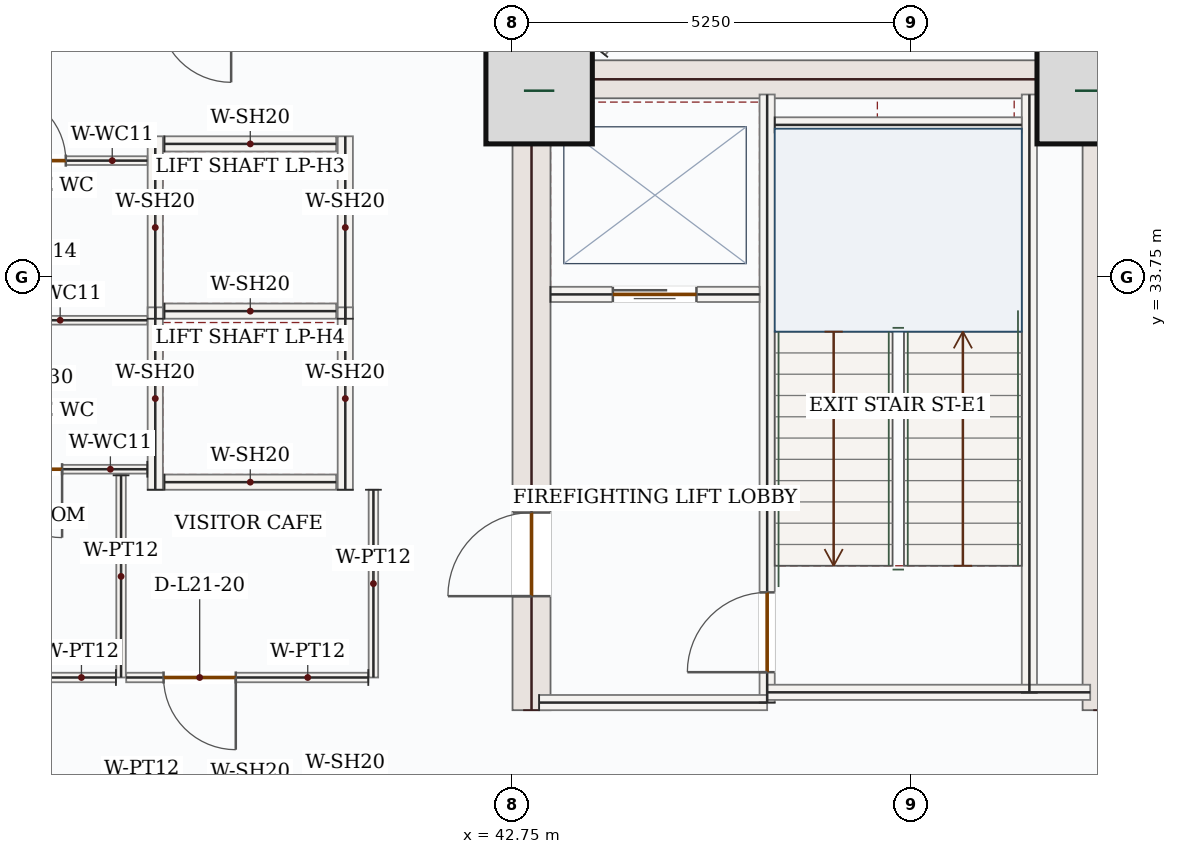
"""IFC4 building model, lengths in metres.
Left out: names, types, materials, properties, quantities, classifications, styles, units other than length and angle.
Written with IfcOpenShell. Run it as: python <this file> out.ifc"""

import sys

from ifc_helpers import new_model, si_unit, direction, frame, frame_2d, origin, origin_2d, place, context, subcontext, project, spatial, rectangle, extrude, source, transform, mapped, element, fill, save


model = new_model("IFC4")
c1 = context("Model", 3, precision=1e-05, world=origin(), true_north=direction((0.0, 1.0)))
c2 = subcontext(c1, "Body", "Model", "MODEL_VIEW")
j1 = project(units=[si_unit("LENGTHUNIT", "METRE"), si_unit("PLANEANGLEUNIT", "RADIAN")], contexts=[c1])
p1 = place(None, origin())
s1 = spatial("IfcSite", under=j1, at=p1, CompositionType="ELEMENT")
p2 = place(p1, origin())
s2 = spatial("IfcBuilding", under=s1, at=p2, CompositionType="ELEMENT")
p3 = place(p2, frame((0.0, 0.0, 96.3)))
s3 = spatial("IfcBuildingStorey", under=s2, at=p3, CompositionType="ELEMENT", Elevation=96.3)
p4 = place(p3, frame((43.0, 28.05, 0.0), z_axis=(0.0, 0.0, 1.0), x_axis=(0.0, 1.0, 0.0)))
e1 = element("IfcWall", 1, at=p4, inside=s3, PredefinedType="SHEAR", context=c2, shape_type="SweptSolid", body=[
    extrude(rectangle(XDim=8.55, YDim=0.5, at=frame_2d((4.275, 0.0))), origin(), (0.0, 0.0, 1.0), 3.95),
])
p5 = place(p4, frame((1.5, 0.0, 0.0)))
e2 = element("IfcOpeningElement", 2, at=p5, cuts=e1, PredefinedType="OPENING", context=c2, shape_type="SweptSolid", body=[
    extrude(rectangle(XDim=1.1, YDim=2.2, at=frame_2d((0.55, 1.1))), frame((0.0, 0.26, 0.0), z_axis=(0.0, -1.0, 0.0), x_axis=(1.0, 0.0, 0.0)), (0.0, 0.0, 1.0), 0.52),
])
m1 = source(origin(), c2, "Body", "SweptSolid", [
    extrude(rectangle(XDim=8.55, YDim=0.5, at=frame_2d((4.275, 0.0))), origin(), (0.0, 0.0, 1.0), 3.95),
])
p6 = place(p3, frame((50.5, 28.05, 0.0), z_axis=(0.0, 0.0, 1.0), x_axis=(0.0, 1.0, 0.0)))
e3 = element("IfcWall", 3, at=p6, inside=s3, PredefinedType="SHEAR", context=c2, shape_type="MappedRepresentation", body=[
    mapped(m1, transform((0.0, 0.0, 0.0), x_axis=(1.0, 0.0, 0.0), y_axis=(0.0, 1.0, 0.0), z_axis=(0.0, 0.0, 1.0), scale=1.0)),
])
m2 = source(origin(), c2, "Body", "SweptSolid", [
    extrude(rectangle(XDim=7.0, YDim=0.5, at=frame_2d((3.5, 0.0))), origin(), (0.0, 0.0, 1.0), 3.95),
])
p7 = place(p3, frame((43.25, 36.35, 0.0), z_axis=(0.0, 0.0, 1.0), x_axis=(1.0, 0.0, 0.0)))
e4 = element("IfcWall", 4, at=p7, inside=s3, PredefinedType="SHEAR", context=c2, shape_type="MappedRepresentation", body=[
    mapped(m2, transform((0.0, 0.0, 0.0), x_axis=(1.0, 0.0, 0.0), y_axis=(0.0, 1.0, 0.0), z_axis=(0.0, 0.0, 1.0), scale=1.0)),
])
m3 = source(origin(), c2, "Body", "SweptSolid", [
    extrude(rectangle(XDim=1.4, YDim=1.4, at=origin_2d()), origin(), (0.0, 0.0, 1.0), 4.2),
])
for number, where, z_axis, x_axis in (
    (5, (43.1, 36.2, 0.0), (0.0, 0.0, 1.0), (1.0, 0.0, 0.0)),
    (6, (50.35, 36.2, 0.0), (0.0, 0.0, 1.0), (1.0, 0.0, 0.0)),
):
    element("IfcColumn", number, at=place(p3, frame(where, z_axis=z_axis, x_axis=x_axis)), inside=s3, PredefinedType="COLUMN", context=c2, shape_type="MappedRepresentation", body=[
        mapped(m3, transform((0.0, 0.0, 0.0), x_axis=(1.0, 0.0, 0.0), y_axis=(0.0, 1.0, 0.0), z_axis=(0.0, 0.0, 1.0), scale=1.0)),
    ])
p8 = place(p3, frame((49.342, 39.26, 0.0), z_axis=(0.0, 0.0, 1.0), x_axis=(0.707106781187, -0.707106781187, 0.0)))
e7 = element("IfcWall", 7, at=p8, inside=s3, PredefinedType="SOLIDWALL", context=c2, shape_type="SweptSolid", body=[
    extrude(rectangle(XDim=5.258, YDim=0.32, at=frame_2d((2.629, 0.0))), origin(), (0.0, 0.0, 1.0), 3.95),
])
p9 = place(p8, frame((1.429, 0.0, 0.85)))
e8 = element("IfcOpeningElement", 8, at=p9, cuts=e7, PredefinedType="OPENING", context=c2, shape_type="SweptSolid", body=[
    extrude(rectangle(XDim=2.4, YDim=1.8, at=frame_2d((1.2, 0.9))), frame((0.0, 0.17, 0.0), z_axis=(0.0, -1.0, 0.0), x_axis=(1.0, 0.0, 0.0)), (0.0, 0.0, 1.0), 0.34),
])
m4 = source(origin(), c2, "Body", "SweptSolid", [
    extrude(rectangle(XDim=7.87, YDim=0.2, at=frame_2d((3.935, 0.0))), origin(), (0.0, 0.0, 1.0), 3.95),
])
p10 = place(p3, frame((49.55, 28.28, 0.0), z_axis=(0.0, 0.0, 1.0), x_axis=(0.0, 1.0, 0.0)))
e9 = element("IfcWall", 9, at=p10, inside=s3, PredefinedType="SOLIDWALL", context=c2, shape_type="MappedRepresentation", body=[
    mapped(m4, transform((0.0, 0.0, 0.0), x_axis=(1.0, 0.0, 0.0), y_axis=(0.0, 1.0, 0.0), z_axis=(0.0, 0.0, 1.0), scale=1.0)),
])
p11 = place(p3, frame((46.1, 28.15, 0.0), z_axis=(0.0, 0.0, 1.0), x_axis=(0.0, 1.0, 0.0)))
e10 = element("IfcWall", 10, at=p11, inside=s3, PredefinedType="SOLIDWALL", context=c2, shape_type="SweptSolid", body=[
    extrude(rectangle(XDim=8.0, YDim=0.2, at=frame_2d((4.0, 0.0))), origin(), (0.0, 0.0, 1.0), 3.95),
])
p12 = place(p11, frame((0.4, 0.0, 0.0)))
e11 = element("IfcOpeningElement", 11, at=p12, cuts=e10, PredefinedType="OPENING", context=c2, shape_type="SweptSolid", body=[
    extrude(rectangle(XDim=1.05, YDim=2.15, at=frame_2d((0.525, 1.075))), frame((0.0, 0.11, 0.0), z_axis=(0.0, -1.0, 0.0), x_axis=(1.0, 0.0, 0.0)), (0.0, 0.0, 1.0), 0.22),
])
m5 = source(origin(), c2, "Body", "SweptSolid", [
    extrude(rectangle(XDim=3.0, YDim=0.2, at=frame_2d((1.5, 0.0))), origin(), (0.0, 0.0, 1.0), 3.95),
])
p13 = place(p3, frame((43.1, 28.15, 0.0), z_axis=(0.0, 0.0, 1.0), x_axis=(1.0, 0.0, 0.0)))
e12 = element("IfcWall", 12, at=p13, inside=s3, PredefinedType="SOLIDWALL", context=c2, shape_type="MappedRepresentation", body=[
    mapped(m5, transform((0.0, 0.0, 0.0), x_axis=(1.0, 0.0, 0.0), y_axis=(0.0, 1.0, 0.0), z_axis=(0.0, 0.0, 1.0), scale=1.0)),
])
m6 = source(origin(), c2, "Body", "SweptSolid", [
    extrude(rectangle(XDim=4.25, YDim=0.2, at=frame_2d((2.125, 0.0))), origin(), (0.0, 0.0, 1.0), 3.95),
])
p14 = place(p3, frame((46.1, 28.285, 0.0), z_axis=(0.0, 0.0, 1.0), x_axis=(1.0, 0.0, 0.0)))
e13 = element("IfcWall", 13, at=p14, inside=s3, PredefinedType="SOLIDWALL", context=c2, shape_type="MappedRepresentation", body=[
    mapped(m6, transform((0.0, 0.0, 0.0), x_axis=(1.0, 0.0, 0.0), y_axis=(0.0, 1.0, 0.0), z_axis=(0.0, 0.0, 1.0), scale=1.0)),
])
m7 = source(origin(), c2, "Body", "SweptSolid", [
    extrude(rectangle(XDim=3.25, YDim=0.2, at=frame_2d((1.625, 0.0))), origin(), (0.0, 0.0, 1.0), 3.95),
])
p15 = place(p3, frame((46.2, 35.75, 0.0), z_axis=(0.0, 0.0, 1.0), x_axis=(1.0, 0.0, 0.0)))
e14 = element("IfcWall", 14, at=p15, inside=s3, PredefinedType="SOLIDWALL", context=c2, shape_type="MappedRepresentation", body=[
    mapped(m7, transform((0.0, 0.0, 0.0), x_axis=(1.0, 0.0, 0.0), y_axis=(0.0, 1.0, 0.0), z_axis=(0.0, 0.0, 1.0), scale=1.0)),
])
p16 = place(p3, frame((43.25, 33.52, 0.0), z_axis=(0.0, 0.0, 1.0), x_axis=(1.0, 0.0, 0.0)))
e15 = element("IfcWall", 15, at=p16, inside=s3, PredefinedType="SOLIDWALL", context=c2, shape_type="SweptSolid", body=[
    extrude(rectangle(XDim=2.75, YDim=0.2, at=frame_2d((1.375, 0.0))), origin(), (0.0, 0.0, 1.0), 3.95),
])
p17 = place(p16, frame((0.82, 0.0, 0.0)))
e16 = element("IfcOpeningElement", 16, at=p17, cuts=e15, PredefinedType="OPENING", context=c2, shape_type="SweptSolid", body=[
    extrude(rectangle(XDim=1.1, YDim=2.15, at=frame_2d((0.55, 1.075))), frame((0.0, 0.11, 0.0), z_axis=(0.0, -1.0, 0.0), x_axis=(1.0, 0.0, 0.0)), (0.0, 0.0, 1.0), 0.22),
])
m8 = source(origin(), c2, "Body", "SweptSolid", [
    extrude(rectangle(XDim=2.4, YDim=0.2, at=frame_2d((1.2, 0.0))), origin(), (0.0, 0.0, 1.0), 3.95),
])
for number, where, z_axis, x_axis in (
    (17, (38.05, 33.2, 0.0), (0.0, 0.0, 1.0), (0.0, 1.0, 0.0)),
    (18, (40.55, 33.2, 0.0), (0.0, 0.0, 1.0), (0.0, 1.0, 0.0)),
):
    element("IfcWall", number, at=place(p3, frame(where, z_axis=z_axis, x_axis=x_axis)), inside=s3, PredefinedType="SOLIDWALL", context=c2, shape_type="MappedRepresentation", body=[
        mapped(m8, transform((0.0, 0.0, 0.0), x_axis=(1.0, 0.0, 0.0), y_axis=(0.0, 1.0, 0.0), z_axis=(0.0, 0.0, 1.0), scale=1.0)),
    ])
m9 = source(origin(), c2, "Body", "SweptSolid", [
    extrude(rectangle(XDim=2.26, YDim=0.2, at=frame_2d((1.13, 0.0))), origin(), (0.0, 0.0, 1.0), 3.95),
])
for number, where, z_axis, x_axis in (
    (19, (38.17, 33.3, 0.0), (0.0, 0.0, 1.0), (1.0, 0.0, 0.0)),
    (20, (38.17, 35.5, 0.0), (0.0, 0.0, 1.0), (1.0, 0.0, 0.0)),
):
    element("IfcWall", number, at=place(p3, frame(where, z_axis=z_axis, x_axis=x_axis)), inside=s3, PredefinedType="SOLIDWALL", context=c2, shape_type="MappedRepresentation", body=[
        mapped(m9, transform((0.0, 0.0, 0.0), x_axis=(1.0, 0.0, 0.0), y_axis=(0.0, 1.0, 0.0), z_axis=(0.0, 0.0, 1.0), scale=1.0)),
    ])
for number, where, z_axis, x_axis in (
    (21, (38.05, 30.95, 0.0), (0.0, 0.0, 1.0), (0.0, 1.0, 0.0)),
    (22, (40.55, 30.95, 0.0), (0.0, 0.0, 1.0), (0.0, 1.0, 0.0)),
):
    element("IfcWall", number, at=place(p3, frame(where, z_axis=z_axis, x_axis=x_axis)), inside=s3, PredefinedType="SOLIDWALL", context=c2, shape_type="MappedRepresentation", body=[
        mapped(m8, transform((0.0, 0.0, 0.0), x_axis=(1.0, 0.0, 0.0), y_axis=(0.0, 1.0, 0.0), z_axis=(0.0, 0.0, 1.0), scale=1.0)),
    ])
p18 = place(p3, frame((38.17, 31.05, 0.0), z_axis=(0.0, 0.0, 1.0), x_axis=(1.0, 0.0, 0.0)))
e23 = element("IfcWall", 23, at=p18, inside=s3, PredefinedType="SOLIDWALL", context=c2, shape_type="MappedRepresentation", body=[
    mapped(m9, transform((0.0, 0.0, 0.0), x_axis=(1.0, 0.0, 0.0), y_axis=(0.0, 1.0, 0.0), z_axis=(0.0, 0.0, 1.0), scale=1.0)),
])
p19 = place(p3, frame((37.945, 31.22, 0.0), z_axis=(0.0, 0.0, 1.0), x_axis=(-1.0, 0.0, 0.0)))
e24 = element("IfcWall", 24, at=p19, inside=s3, PredefinedType="PARTITIONING", context=c2, shape_type="SweptSolid", body=[
    extrude(rectangle(XDim=2.355, YDim=0.115, at=frame_2d((1.177, 0.0))), origin(), (0.0, 0.0, 1.0), 3.95),
])
p20 = place(p19, frame((1.121, 0.0, 0.0)))
e25 = element("IfcOpeningElement", 25, at=p20, cuts=e24, PredefinedType="OPENING", context=c2, shape_type="SweptSolid", body=[
    extrude(rectangle(XDim=0.9, YDim=2.1, at=frame_2d((0.45, 1.05))), frame((0.0, 0.067, 0.0), z_axis=(0.0, -1.0, 0.0), x_axis=(1.0, 0.0, 0.0)), (0.0, 0.0, 1.0), 0.135),
])
m10 = source(origin(), c2, "Body", "SweptSolid", [
    extrude(rectangle(XDim=2.292, YDim=0.115, at=frame_2d((1.146, 0.0))), origin(), (0.0, 0.0, 1.0), 3.95),
])
p21 = place(p3, frame((35.653, 33.18, 0.0), z_axis=(0.0, 0.0, 1.0), x_axis=(1.0, 0.0, 0.0)))
e26 = element("IfcWall", 26, at=p21, inside=s3, PredefinedType="PARTITIONING", context=c2, shape_type="MappedRepresentation", body=[
    mapped(m10, transform((0.0, 0.0, 0.0), x_axis=(1.0, 0.0, 0.0), y_axis=(0.0, 1.0, 0.0), z_axis=(0.0, 0.0, 1.0), scale=1.0)),
])
p22 = place(p3, frame((35.653, 35.28, 0.0), z_axis=(0.0, 0.0, 1.0), x_axis=(1.0, 0.0, 0.0)))
e27 = element("IfcWall", 27, at=p22, inside=s3, PredefinedType="PARTITIONING", context=c2, shape_type="SweptSolid", body=[
    extrude(rectangle(XDim=2.292, YDim=0.115, at=frame_2d((1.146, 0.0))), origin(), (0.0, 0.0, 1.0), 3.95),
])
p23 = place(p22, frame((0.32, 0.0, 0.0)))
e28 = element("IfcOpeningElement", 28, at=p23, cuts=e27, PredefinedType="OPENING", context=c2, shape_type="SweptSolid", body=[
    extrude(rectangle(XDim=0.9, YDim=2.1, at=frame_2d((0.45, 1.05))), frame((0.0, 0.067, 0.0), z_axis=(0.0, -1.0, 0.0), x_axis=(1.0, 0.0, 0.0)), (0.0, 0.0, 1.0), 0.135),
])
m11 = source(origin(), c2, "Body", "SweptSolid", [
    extrude(rectangle(XDim=2.66, YDim=0.125, at=frame_2d((1.33, 0.0))), origin(), (0.0, 0.0, 1.0), 3.95),
])
p24 = place(p3, frame((37.6, 31.14, 0.0), z_axis=(0.0, 0.0, 1.0), x_axis=(0.0, -1.0, 0.0)))
e29 = element("IfcWall", 29, at=p24, inside=s3, PredefinedType="PARTITIONING", context=c2, shape_type="MappedRepresentation", body=[
    mapped(m11, transform((0.0, 0.0, 0.0), x_axis=(1.0, 0.0, 0.0), y_axis=(0.0, 1.0, 0.0), z_axis=(0.0, 0.0, 1.0), scale=1.0)),
])
p25 = place(p3, frame((37.532, 28.48, 0.0), z_axis=(0.0, 0.0, 1.0), x_axis=(-1.0, 0.0, 0.0)))
e30 = element("IfcWall", 30, at=p25, inside=s3, PredefinedType="PARTITIONING", context=c2, shape_type="SweptSolid", body=[
    extrude(rectangle(XDim=3.065, YDim=0.125, at=frame_2d((1.532, 0.0))), origin(), (0.0, 0.0, 1.0), 3.95),
])
p26 = place(p25, frame((1.058, 0.0, 0.0)))
e31 = element("IfcOpeningElement", 31, at=p26, cuts=e30, PredefinedType="OPENING", context=c2, shape_type="SweptSolid", body=[
    extrude(rectangle(XDim=0.95, YDim=2.15, at=frame_2d((0.475, 1.075))), frame((0.0, 0.073, 0.0), z_axis=(0.0, -1.0, 0.0), x_axis=(1.0, 0.0, 0.0)), (0.0, 0.0, 1.0), 0.145),
])
m12 = source(origin(), c2, "Body", "SweptSolid", [
    extrude(rectangle(XDim=2.47, YDim=0.125, at=frame_2d((1.235, 0.0))), origin(), (0.0, 0.0, 1.0), 3.95),
])
p27 = place(p3, frame((40.92, 30.95, 0.0), z_axis=(0.0, 0.0, 1.0), x_axis=(0.0, -1.0, 0.0)))
e32 = element("IfcWall", 32, at=p27, inside=s3, PredefinedType="PARTITIONING", context=c2, shape_type="MappedRepresentation", body=[
    mapped(m12, transform((0.0, 0.0, 0.0), x_axis=(1.0, 0.0, 0.0), y_axis=(0.0, 1.0, 0.0), z_axis=(0.0, 0.0, 1.0), scale=1.0)),
])
p28 = place(p3, frame((40.853, 28.48, 0.0), z_axis=(0.0, 0.0, 1.0), x_axis=(-1.0, 0.0, 0.0)))
e33 = element("IfcWall", 33, at=p28, inside=s3, PredefinedType="PARTITIONING", context=c2, shape_type="SweptSolid", body=[
    extrude(rectangle(XDim=3.185, YDim=0.125, at=frame_2d((1.593, 0.0))), origin(), (0.0, 0.0, 1.0), 3.95),
])
p29 = place(p28, frame((1.743, 0.0, 0.0)))
e34 = element("IfcOpeningElement", 34, at=p29, cuts=e33, PredefinedType="OPENING", context=c2, shape_type="SweptSolid", body=[
    extrude(rectangle(XDim=0.95, YDim=2.15, at=frame_2d((0.475, 1.075))), frame((0.0, 0.073, 0.0), z_axis=(0.0, -1.0, 0.0), x_axis=(1.0, 0.0, 0.0)), (0.0, 0.0, 1.0), 0.145),
])
m13 = source(origin(), c2, "Body", "SweptSolid", [
    extrude(rectangle(XDim=3.072, YDim=0.125, at=frame_2d((1.536, 0.0))), origin(), (0.0, 0.0, 1.0), 3.95),
])
p30 = place(p3, frame((43.92, 36.709, 0.0), z_axis=(0.0, 0.0, 1.0), x_axis=(0.629760486176, 0.776789373029, 0.0)))
e35 = element("IfcWall", 35, at=p30, inside=s3, PredefinedType="PARTITIONING", context=c2, shape_type="MappedRepresentation", body=[
    mapped(m13, transform((0.0, 0.0, 0.0), x_axis=(1.0, 0.0, 0.0), y_axis=(0.0, 1.0, 0.0), z_axis=(0.0, 0.0, 1.0), scale=1.0)),
])
m14 = source(origin(), c2, "Body", "SweptSolid", [
    extrude(rectangle(XDim=2.4, YDim=1.8, at=frame_2d((1.2, 0.9))), frame((0.0, 0.03, 0.0), z_axis=(0.0, -1.0, 0.0), x_axis=(1.0, 0.0, 0.0)), (0.0, 0.0, 1.0), 0.06),
])
p31 = place(p9, origin())
e36 = element("IfcWindow", 36, at=p31, inside=s3, PartitioningType="DOUBLE_PANEL_VERTICAL", PredefinedType="WINDOW", context=c2, shape_type="MappedRepresentation", body=[
    mapped(m14, transform((0.0, 0.0, 0.0), x_axis=(1.0, 0.0, 0.0), y_axis=(0.0, 1.0, 0.0), z_axis=(0.0, 0.0, 1.0), scale=1.0)),
])
fill(e8, e36)
m15 = source(origin(), c2, "Body", "SweptSolid", [
    extrude(rectangle(XDim=1.05, YDim=2.15, at=frame_2d((0.525, 1.075))), frame((0.0, 0.025, 0.0), z_axis=(0.0, -1.0, 0.0), x_axis=(1.0, 0.0, 0.0)), (0.0, 0.0, 1.0), 0.05),
])
p32 = place(p12, origin())
e37 = element("IfcDoor", 37, at=p32, inside=s3, OperationType="SINGLE_SWING_LEFT", PredefinedType="DOOR", context=c2, shape_type="MappedRepresentation", body=[
    mapped(m15, transform((0.0, 0.0, 0.0), x_axis=(1.0, 0.0, 0.0), y_axis=(0.0, 1.0, 0.0), z_axis=(0.0, 0.0, 1.0), scale=1.0)),
])
fill(e11, e37)
m16 = source(origin(), c2, "Body", "SweptSolid", [
    extrude(rectangle(XDim=1.1, YDim=2.15, at=frame_2d((0.55, 1.075))), frame((0.0, 0.025, 0.0), z_axis=(0.0, -1.0, 0.0), x_axis=(1.0, 0.0, 0.0)), (0.0, 0.0, 1.0), 0.05),
])
p33 = place(p17, origin())
e38 = element("IfcDoor", 38, at=p33, inside=s3, OperationType="DOUBLE_DOOR_SLIDING", PredefinedType="DOOR", context=c2, shape_type="MappedRepresentation", body=[
    mapped(m16, transform((0.0, 0.0, 0.0), x_axis=(1.0, 0.0, 0.0), y_axis=(0.0, 1.0, 0.0), z_axis=(0.0, 0.0, 1.0), scale=1.0)),
])
fill(e16, e38)
m17 = source(origin(), c2, "Body", "SweptSolid", [
    extrude(rectangle(XDim=1.1, YDim=2.2, at=frame_2d((0.55, 1.1))), frame((0.0, 0.025, 0.0), z_axis=(0.0, -1.0, 0.0), x_axis=(1.0, 0.0, 0.0)), (0.0, 0.0, 1.0), 0.05),
])
p34 = place(p5, origin())
e39 = element("IfcDoor", 39, at=p34, inside=s3, OperationType="SINGLE_SWING_LEFT", PredefinedType="DOOR", context=c2, shape_type="MappedRepresentation", body=[
    mapped(m17, transform((0.0, 0.0, 0.0), x_axis=(1.0, 0.0, 0.0), y_axis=(0.0, 1.0, 0.0), z_axis=(0.0, 0.0, 1.0), scale=1.0)),
])
fill(e2, e39)
m18 = source(origin(), c2, "Body", "SweptSolid", [
    extrude(rectangle(XDim=0.9, YDim=2.1, at=frame_2d((0.45, 1.05))), frame((0.0, 0.025, 0.0), z_axis=(0.0, -1.0, 0.0), x_axis=(1.0, 0.0, 0.0)), (0.0, 0.0, 1.0), 0.05),
])
p35 = place(p23, origin())
e40 = element("IfcDoor", 40, at=p35, inside=s3, OperationType="SINGLE_SWING_LEFT", PredefinedType="DOOR", context=c2, shape_type="MappedRepresentation", body=[
    mapped(m18, transform((0.0, 0.0, 0.0), x_axis=(1.0, 0.0, 0.0), y_axis=(0.0, 1.0, 0.0), z_axis=(0.0, 0.0, 1.0), scale=1.0)),
])
fill(e28, e40)
m19 = source(origin(), c2, "Body", "SweptSolid", [
    extrude(rectangle(XDim=0.95, YDim=2.15, at=frame_2d((0.475, 1.075))), frame((0.0, 0.025, 0.0), z_axis=(0.0, -1.0, 0.0), x_axis=(1.0, 0.0, 0.0)), (0.0, 0.0, 1.0), 0.05),
])
p36 = place(p29, origin())
e41 = element("IfcDoor", 41, at=p36, inside=s3, OperationType="SINGLE_SWING_LEFT", PredefinedType="DOOR", context=c2, shape_type="MappedRepresentation", body=[
    mapped(m19, transform((0.0, 0.0, 0.0), x_axis=(1.0, 0.0, 0.0), y_axis=(0.0, 1.0, 0.0), z_axis=(0.0, 0.0, 1.0), scale=1.0)),
])
fill(e34, e41)
p37 = place(p20, origin())
e42 = element("IfcDoor", 42, at=p37, inside=s3, OperationType="SINGLE_SWING_LEFT", PredefinedType="DOOR", context=c2, shape_type="MappedRepresentation", body=[
    mapped(m18, transform((0.0, 0.0, 0.0), x_axis=(1.0, 0.0, 0.0), y_axis=(0.0, 1.0, 0.0), z_axis=(0.0, 0.0, 1.0), scale=1.0)),
])
fill(e25, e42)
save(model, sys.argv[1])
